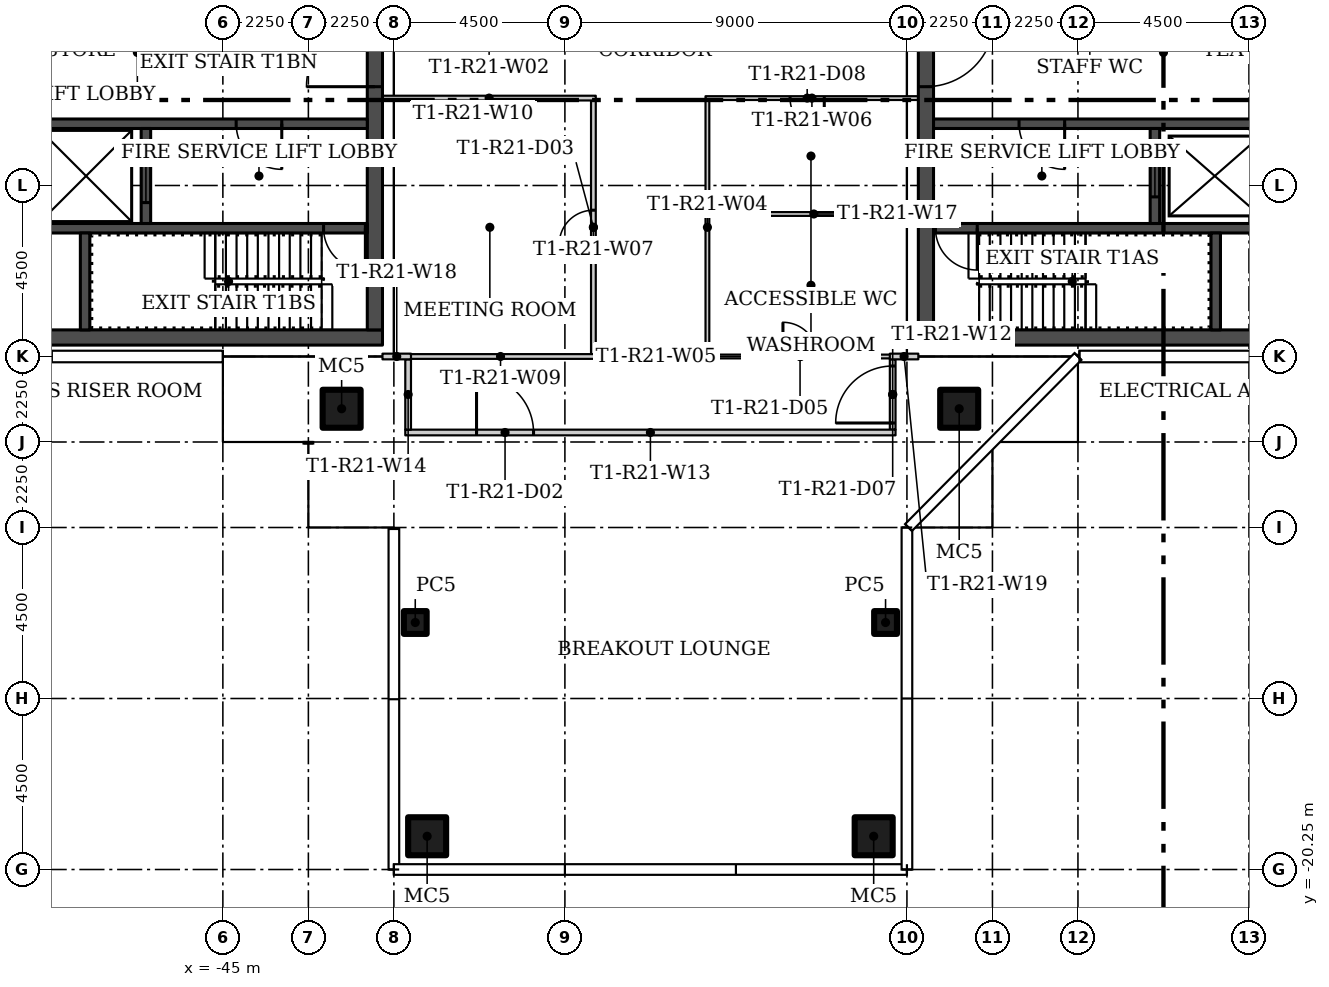
"""IFC4 building model, lengths in metres.
Left out: names, types, materials, properties, quantities, classifications, styles, units other than length and angle.
Written with IfcOpenShell. Run it as: python <this file> out.ifc"""

import sys

from ifc_helpers import new_model, si_unit, direction, frame, frame_2d, origin, origin_2d, place, context, subcontext, project, spatial, rectangle, hollow_rectangle, extrude, element, fill, save


model = new_model("IFC4")
c1 = context("Model", 3, precision=1e-05, world=origin(), true_north=direction((0.0, 1.0)))
c2 = subcontext(c1, "Body", "Model", "MODEL_VIEW")
j1 = project(units=[si_unit("LENGTHUNIT", "METRE"), si_unit("PLANEANGLEUNIT", "RADIAN")], contexts=[c1])
p1 = place(None, origin())
s1 = spatial("IfcSite", under=j1, at=p1, CompositionType="ELEMENT")
p2 = place(p1, origin())
s2 = spatial("IfcBuilding", under=s1, at=p2, CompositionType="ELEMENT")
p3 = place(p2, frame((0.0, 0.0, 194.4)))
s3 = spatial("IfcBuildingStorey", under=s2, at=p3, CompositionType="ELEMENT", Elevation=194.4)
for number, where in (
    (1, (-25.625, -8.125, 0.0)),
    (2, (-41.875, -8.125, 0.0)),
):
    element("IfcColumn", number, at=place(p3, frame(where)), inside=s3, PredefinedType="COLUMN", context=c2, shape_type="SweptSolid", body=[
        extrude(hollow_rectangle(XDim=1.0, YDim=1.0, WallThickness=0.04, at=origin_2d()), origin(), (0.0, 0.0, 1.0), 3.55),
    ])
p4 = place(p3, frame((-39.938, -13.75, 0.0)))
e3 = element("IfcColumn", 3, at=p4, inside=s3, PredefinedType="COLUMN", context=c2, shape_type="SweptSolid", body=[
    extrude(hollow_rectangle(XDim=0.6, YDim=0.6, WallThickness=0.02, at=origin_2d()), origin(), (0.0, 0.0, 1.0), 3.55),
])
p5 = place(p3, frame((-39.625, -19.375, 0.0)))
e4 = element("IfcColumn", 4, at=p5, inside=s3, PredefinedType="COLUMN", context=c2, shape_type="SweptSolid", body=[
    extrude(hollow_rectangle(XDim=1.0, YDim=1.0, WallThickness=0.04, at=origin_2d()), origin(), (0.0, 0.0, 1.0), 3.55),
])
p6 = place(p3, frame((-27.562, -13.75, 0.0)))
e5 = element("IfcColumn", 5, at=p6, inside=s3, PredefinedType="COLUMN", context=c2, shape_type="SweptSolid", body=[
    extrude(hollow_rectangle(XDim=0.6, YDim=0.6, WallThickness=0.02, at=origin_2d()), origin(), (0.0, 0.0, 1.0), 3.55),
])
p7 = place(p3, frame((-27.875, -19.375, 0.0)))
e6 = element("IfcColumn", 6, at=p7, inside=s3, PredefinedType="COLUMN", context=c2, shape_type="SweptSolid", body=[
    extrude(hollow_rectangle(XDim=1.0, YDim=1.0, WallThickness=0.04, at=origin_2d()), origin(), (0.0, 0.0, 1.0), 3.55),
])
p8 = place(p3, frame((-32.25, -0.0, 0.0), z_axis=(0.0, 0.0, 1.0), x_axis=(0.0, -1.0, 0.0)))
e7 = element("IfcWall", 7, at=p8, inside=s3, PredefinedType="PARTITIONING", context=c2, shape_type="SweptSolid", body=[
    extrude(rectangle(XDim=6.7, YDim=0.1, at=frame_2d((3.35, 0.0))), origin(), (0.0, 0.0, 1.0), 3.55),
])
p9 = place(p3, frame((-32.3, -6.75, 0.0)))
e8 = element("IfcWall", 8, at=p9, inside=s3, PredefinedType="PARTITIONING", context=c2, shape_type="SweptSolid", body=[
    extrude(rectangle(XDim=5.0, YDim=0.1, at=frame_2d((2.5, 0.0))), origin(), (0.0, 0.0, 1.0), 3.55),
])
p10 = place(p9, frame((2.038, 0.0, 0.0)))
e9 = element("IfcOpeningElement", 9, at=p10, cuts=e8, PredefinedType="OPENING", context=c2, shape_type="SweptSolid", body=[
    extrude(rectangle(XDim=0.9, YDim=2.1, at=frame_2d((0.45, 1.05))), frame((0.0, 0.06, 0.0), z_axis=(0.0, -1.0, 0.0), x_axis=(1.0, 0.0, 0.0)), (0.0, 0.0, 1.0), 0.12),
])
p11 = place(p3, frame((-26.7, 0.05, 0.0), z_axis=(0.0, 0.0, 1.0), x_axis=(-1.0, 0.0, 0.0)))
e10 = element("IfcWall", 10, at=p11, inside=s3, PredefinedType="PARTITIONING", context=c2, shape_type="SweptSolid", body=[
    extrude(rectangle(XDim=5.6, YDim=0.1, at=frame_2d((2.8, 0.0))), origin(), (0.0, 0.0, 1.0), 3.55),
])
p12 = place(p11, frame((2.475, 0.0, 0.0)))
e11 = element("IfcOpeningElement", 11, at=p12, cuts=e10, PredefinedType="OPENING", context=c2, shape_type="SweptSolid", body=[
    extrude(rectangle(XDim=0.9, YDim=2.1, at=frame_2d((0.45, 1.05))), frame((0.0, 0.06, 0.0), z_axis=(0.0, -1.0, 0.0), x_axis=(1.0, 0.0, 0.0)), (0.0, 0.0, 1.0), 0.12),
])
p13 = place(p3, frame((-35.25, -6.688, 0.0), z_axis=(0.0, 0.0, 1.0), x_axis=(0.0, 1.0, 0.0)))
e12 = element("IfcWall", 12, at=p13, inside=s3, PredefinedType="PARTITIONING", context=c2, shape_type="SweptSolid", body=[
    extrude(rectangle(XDim=6.675, YDim=0.125, at=frame_2d((3.337, 0.0))), origin(), (0.0, 0.0, 1.0), 3.55),
])
p14 = place(p13, frame((2.887, 0.0, 0.0)))
e13 = element("IfcOpeningElement", 13, at=p14, cuts=e12, PredefinedType="OPENING", context=c2, shape_type="SweptSolid", body=[
    extrude(rectangle(XDim=0.9, YDim=2.1, at=frame_2d((0.45, 1.05))), frame((0.0, 0.073, 0.0), z_axis=(0.0, -1.0, 0.0), x_axis=(1.0, 0.0, 0.0)), (0.0, 0.0, 1.0), 0.145),
])
p15 = place(p3, frame((-40.2, -6.75, 0.0)))
e14 = element("IfcWall", 14, at=p15, inside=s3, PredefinedType="PARTITIONING", context=c2, shape_type="SweptSolid", body=[
    extrude(rectangle(XDim=5.012, YDim=0.125, at=frame_2d((2.506, 0.0))), origin(), (0.0, 0.0, 1.0), 3.55),
])
p16 = place(p3, frame((-35.188, 0.05, 0.0), z_axis=(0.0, 0.0, 1.0), x_axis=(-1.0, 0.0, 0.0)))
e15 = element("IfcWall", 15, at=p16, inside=s3, PredefinedType="PARTITIONING", context=c2, shape_type="SweptSolid", body=[
    extrude(rectangle(XDim=5.613, YDim=0.125, at=frame_2d((2.806, 0.0))), origin(), (0.0, 0.0, 1.0), 3.55),
])
p17 = place(p3, frame((-27.375, -8.675, 0.0), z_axis=(0.0, 0.0, 1.0), x_axis=(0.0, 1.0, 0.0)))
e16 = element("IfcWall", 16, at=p17, inside=s3, PredefinedType="PARTITIONING", context=c2, shape_type="SweptSolid", body=[
    extrude(rectangle(XDim=1.85, YDim=0.15, at=frame_2d((0.925, 0.0))), origin(), (0.0, 0.0, 1.0), 3.55),
])
p18 = place(p17, frame((0.175, 0.0, 0.0)))
e17 = element("IfcOpeningElement", 17, at=p18, cuts=e16, PredefinedType="OPENING", context=c2, shape_type="SweptSolid", body=[
    extrude(rectangle(XDim=1.5, YDim=2.1, at=frame_2d((0.75, 1.05))), frame((0.0, 0.085, 0.0), z_axis=(0.0, -1.0, 0.0), x_axis=(1.0, 0.0, 0.0)), (0.0, 0.0, 1.0), 0.17),
])
p19 = place(p3, frame((-40.2, -8.75, 0.0)))
e18 = element("IfcWall", 18, at=p19, inside=s3, PredefinedType="PARTITIONING", context=c2, shape_type="SweptSolid", body=[
    extrude(rectangle(XDim=12.9, YDim=0.15, at=frame_2d((6.45, 0.0))), origin(), (0.0, 0.0, 1.0), 3.55),
])
p20 = place(p19, frame((1.875, 0.0, 0.0)))
e19 = element("IfcOpeningElement", 19, at=p20, cuts=e18, PredefinedType="OPENING", context=c2, shape_type="SweptSolid", body=[
    extrude(rectangle(XDim=1.5, YDim=2.1, at=frame_2d((0.75, 1.05))), frame((0.0, 0.085, 0.0), z_axis=(0.0, -1.0, 0.0), x_axis=(1.0, 0.0, 0.0)), (0.0, 0.0, 1.0), 0.17),
])
p21 = place(p3, frame((-40.125, -6.825, 0.0), z_axis=(0.0, 0.0, 1.0), x_axis=(0.0, -1.0, 0.0)))
e20 = element("IfcWall", 20, at=p21, inside=s3, PredefinedType="PARTITIONING", context=c2, shape_type="SweptSolid", body=[
    extrude(rectangle(XDim=1.85, YDim=0.15, at=frame_2d((0.925, 0.0))), origin(), (0.0, 0.0, 1.0), 3.55),
])
p22 = place(p3, frame((-26.7, -3.0, 0.0), z_axis=(0.0, 0.0, 1.0), x_axis=(-1.0, 0.0, 0.0)))
e21 = element("IfcWall", 21, at=p22, inside=s3, PredefinedType="PARTITIONING", context=c2, shape_type="SweptSolid", body=[
    extrude(rectangle(XDim=5.5, YDim=0.1, at=frame_2d((2.75, 0.0))), origin(), (0.0, 0.0, 1.0), 3.55),
])
for number, where in (
    (22, (-40.8, -6.75, 0.0)),
    (23, (-27.45, -6.75, 0.0)),
):
    element("IfcWall", number, at=place(p3, frame(where)), inside=s3, PredefinedType="PARTITIONING", context=c2, shape_type="SweptSolid", body=[
        extrude(rectangle(XDim=0.75, YDim=0.15, at=frame_2d((0.375, 0.0))), origin(), (0.0, 0.0, 1.0), 3.55),
    ])
p23 = place(p3, frame((-26.7, -6.25, 0.0)))
e24 = element("IfcWall", 24, at=p23, inside=s3, PredefinedType="SHEAR", context=c2, shape_type="SweptSolid", body=[
    extrude(rectangle(XDim=12.9, YDim=0.4, at=frame_2d((6.45, 0.0))), origin(), (0.0, 0.0, 1.0), 3.55),
])
p24 = place(p3, frame((-26.5, 6.05, 0.0), z_axis=(0.0, 0.0, 1.0), x_axis=(0.0, -1.0, 0.0)))
e25 = element("IfcWall", 25, at=p24, inside=s3, PredefinedType="SHEAR", context=c2, shape_type="SweptSolid", body=[
    extrude(rectangle(XDim=12.1, YDim=0.4, at=frame_2d((6.05, 0.0))), origin(), (0.0, 0.0, 1.0), 3.55),
])
p25 = place(p24, frame((3.9, 0.0, 0.0)))
e26 = element("IfcOpeningElement", 26, at=p25, cuts=e25, PredefinedType="OPENING", context=c2, shape_type="SweptSolid", body=[
    extrude(rectangle(XDim=1.8, YDim=2.4, at=frame_2d((0.9, 1.2))), frame((0.0, 0.21, 0.0), z_axis=(0.0, -1.0, 0.0), x_axis=(1.0, 0.0, 0.0)), (0.0, 0.0, 1.0), 0.42),
])
p26 = place(p3, frame((-14.2, -3.375, 0.0), z_axis=(0.0, 0.0, 1.0), x_axis=(-1.0, 0.0, 0.0)))
e27 = element("IfcWall", 27, at=p26, inside=s3, PredefinedType="SHEAR", context=c2, shape_type="SweptSolid", body=[
    extrude(rectangle(XDim=12.1, YDim=0.25, at=frame_2d((6.05, 0.0))), origin(), (0.0, 0.0, 1.0), 3.55),
])
p27 = place(p26, frame((10.95, 0.0, 0.0)))
e28 = element("IfcOpeningElement", 28, at=p27, cuts=e27, PredefinedType="OPENING", context=c2, shape_type="SweptSolid", body=[
    extrude(rectangle(XDim=1.1, YDim=2.1, at=frame_2d((0.55, 1.05))), frame((0.0, 0.135, 0.0), z_axis=(0.0, -1.0, 0.0), x_axis=(1.0, 0.0, 0.0)), (0.0, 0.0, 1.0), 0.27),
])
p28 = place(p3, frame((-18.875, -6.05, 0.0), z_axis=(0.0, 0.0, 1.0), x_axis=(0.0, 1.0, 0.0)))
e29 = element("IfcWall", 29, at=p28, inside=s3, PredefinedType="SHEAR", context=c2, shape_type="SweptSolid", body=[
    extrude(rectangle(XDim=2.55, YDim=0.25, at=frame_2d((1.275, 0.0))), origin(), (0.0, 0.0, 1.0), 3.55),
])
p29 = place(p3, frame((-14.2, -0.625, 0.0), z_axis=(0.0, 0.0, 1.0), x_axis=(-1.0, 0.0, 0.0)))
e30 = element("IfcWall", 30, at=p29, inside=s3, PredefinedType="SHEAR", context=c2, shape_type="SweptSolid", body=[
    extrude(rectangle(XDim=12.1, YDim=0.25, at=frame_2d((6.05, 0.0))), origin(), (0.0, 0.0, 1.0), 3.55),
])
p30 = place(p29, frame((8.65, 0.0, 0.0)))
e31 = element("IfcOpeningElement", 31, at=p30, cuts=e30, PredefinedType="OPENING", context=c2, shape_type="SweptSolid", body=[
    extrude(rectangle(XDim=1.2, YDim=2.1, at=frame_2d((0.6, 1.05))), frame((0.0, 0.135, 0.0), z_axis=(0.0, -1.0, 0.0), x_axis=(1.0, 0.0, 0.0)), (0.0, 0.0, 1.0), 0.27),
])
p31 = place(p29, frame((1.175, 0.0, 0.0)))
e32 = element("IfcOpeningElement", 32, at=p31, cuts=e30, PredefinedType="OPENING", context=c2, shape_type="SweptSolid", body=[
    extrude(rectangle(XDim=0.9, YDim=2.1, at=frame_2d((0.45, 1.05))), frame((0.0, 0.135, 0.0), z_axis=(0.0, -1.0, 0.0), x_axis=(1.0, 0.0, 0.0)), (0.0, 0.0, 1.0), 0.27),
])
p32 = place(p3, frame((-20.475, -3.25, 0.0), z_axis=(0.0, 0.0, 1.0), x_axis=(0.0, 1.0, 0.0)))
e33 = element("IfcWall", 33, at=p32, inside=s3, PredefinedType="SHEAR", context=c2, shape_type="SweptSolid", body=[
    extrude(rectangle(XDim=2.5, YDim=0.25, at=frame_2d((1.25, 0.0))), origin(), (0.0, 0.0, 1.0), 3.55),
])
p33 = place(p32, frame((0.7, 0.0, 0.0)))
e34 = element("IfcOpeningElement", 34, at=p33, cuts=e33, PredefinedType="OPENING", context=c2, shape_type="SweptSolid", body=[
    extrude(rectangle(XDim=1.1, YDim=2.1, at=frame_2d((0.55, 1.05))), frame((0.0, 0.135, 0.0), z_axis=(0.0, -1.0, 0.0), x_axis=(1.0, 0.0, 0.0)), (0.0, 0.0, 1.0), 0.27),
])
p34 = place(p3, frame((-40.8, -6.25, 0.0), z_axis=(0.0, 0.0, 1.0), x_axis=(-1.0, 0.0, 0.0)))
e35 = element("IfcWall", 35, at=p34, inside=s3, PredefinedType="SHEAR", context=c2, shape_type="SweptSolid", body=[
    extrude(rectangle(XDim=12.9, YDim=0.4, at=frame_2d((6.45, 0.0))), origin(), (0.0, 0.0, 1.0), 3.55),
])
p35 = place(p3, frame((-41.0, -6.05, 0.0), z_axis=(0.0, 0.0, 1.0), x_axis=(0.0, 1.0, 0.0)))
e36 = element("IfcWall", 36, at=p35, inside=s3, PredefinedType="SHEAR", context=c2, shape_type="SweptSolid", body=[
    extrude(rectangle(XDim=12.1, YDim=0.4, at=frame_2d((6.05, 0.0))), origin(), (0.0, 0.0, 1.0), 3.55),
])
p36 = place(p35, frame((6.4, 0.0, 0.0)))
e37 = element("IfcOpeningElement", 37, at=p36, cuts=e36, PredefinedType="OPENING", context=c2, shape_type="SweptSolid", body=[
    extrude(rectangle(XDim=1.8, YDim=2.4, at=frame_2d((0.9, 1.2))), frame((0.0, 0.21, 0.0), z_axis=(0.0, -1.0, 0.0), x_axis=(1.0, 0.0, 0.0)), (0.0, 0.0, 1.0), 0.42),
])
p37 = place(p3, frame((-41.2, -3.375, 0.0), z_axis=(0.0, 0.0, 1.0), x_axis=(-1.0, 0.0, 0.0)))
e38 = element("IfcWall", 38, at=p37, inside=s3, PredefinedType="SHEAR", context=c2, shape_type="SweptSolid", body=[
    extrude(rectangle(XDim=12.1, YDim=0.25, at=frame_2d((6.05, 0.0))), origin(), (0.0, 0.0, 1.0), 3.55),
])
p38 = place(p37, frame((0.05, 0.0, 0.0)))
e39 = element("IfcOpeningElement", 39, at=p38, cuts=e38, PredefinedType="OPENING", context=c2, shape_type="SweptSolid", body=[
    extrude(rectangle(XDim=1.1, YDim=2.1, at=frame_2d((0.55, 1.05))), frame((0.0, 0.135, 0.0), z_axis=(0.0, -1.0, 0.0), x_axis=(1.0, 0.0, 0.0)), (0.0, 0.0, 1.0), 0.27),
])
p39 = place(p3, frame((-48.625, -6.05, 0.0), z_axis=(0.0, 0.0, 1.0), x_axis=(0.0, 1.0, 0.0)))
e40 = element("IfcWall", 40, at=p39, inside=s3, PredefinedType="SHEAR", context=c2, shape_type="SweptSolid", body=[
    extrude(rectangle(XDim=2.55, YDim=0.25, at=frame_2d((1.275, 0.0))), origin(), (0.0, 0.0, 1.0), 3.55),
])
p40 = place(p3, frame((-41.2, -0.625, 0.0), z_axis=(0.0, 0.0, 1.0), x_axis=(-1.0, 0.0, 0.0)))
e41 = element("IfcWall", 41, at=p40, inside=s3, PredefinedType="SHEAR", context=c2, shape_type="SweptSolid", body=[
    extrude(rectangle(XDim=12.1, YDim=0.25, at=frame_2d((6.05, 0.0))), origin(), (0.0, 0.0, 1.0), 3.55),
])
p41 = place(p40, frame((2.25, 0.0, 0.0)))
e42 = element("IfcOpeningElement", 42, at=p41, cuts=e41, PredefinedType="OPENING", context=c2, shape_type="SweptSolid", body=[
    extrude(rectangle(XDim=1.2, YDim=2.1, at=frame_2d((0.6, 1.05))), frame((0.0, 0.135, 0.0), z_axis=(0.0, -1.0, 0.0), x_axis=(1.0, 0.0, 0.0)), (0.0, 0.0, 1.0), 0.27),
])
p42 = place(p40, frame((10.025, 0.0, 0.0)))
e43 = element("IfcOpeningElement", 43, at=p42, cuts=e41, PredefinedType="OPENING", context=c2, shape_type="SweptSolid", body=[
    extrude(rectangle(XDim=0.9, YDim=2.1, at=frame_2d((0.45, 1.05))), frame((0.0, 0.135, 0.0), z_axis=(0.0, -1.0, 0.0), x_axis=(1.0, 0.0, 0.0)), (0.0, 0.0, 1.0), 0.27),
])
p43 = place(p3, frame((-47.025, -3.25, 0.0), z_axis=(0.0, 0.0, 1.0), x_axis=(0.0, 1.0, 0.0)))
e44 = element("IfcWall", 44, at=p43, inside=s3, PredefinedType="SHEAR", context=c2, shape_type="SweptSolid", body=[
    extrude(rectangle(XDim=2.5, YDim=0.25, at=frame_2d((1.25, 0.0))), origin(), (0.0, 0.0, 1.0), 3.55),
])
p44 = place(p43, frame((0.55, 0.0, 0.0)))
e45 = element("IfcOpeningElement", 45, at=p44, cuts=e44, PredefinedType="OPENING", context=c2, shape_type="SweptSolid", body=[
    extrude(rectangle(XDim=1.4, YDim=2.4, at=frame_2d((0.7, 1.2))), frame((0.0, 0.135, 0.0), z_axis=(0.0, -1.0, 0.0), x_axis=(1.0, 0.0, 0.0)), (0.0, 0.0, 1.0), 0.27),
])
p45 = place(p20, origin())
e46 = element("IfcDoor", 46, at=p45, inside=s3, OperationType="DOUBLE_DOOR_SINGLE_SWING", PredefinedType="DOOR", context=c2, shape_type="SweptSolid", body=[
    extrude(rectangle(XDim=1.5, YDim=2.1, at=frame_2d((0.75, 1.05))), frame((0.0, 0.025, 0.0), z_axis=(0.0, -1.0, 0.0), x_axis=(1.0, 0.0, 0.0)), (0.0, 0.0, 1.0), 0.05),
])
fill(e19, e46)
p46 = place(p14, origin())
e47 = element("IfcDoor", 47, at=p46, inside=s3, OperationType="SINGLE_SWING_LEFT", PredefinedType="DOOR", context=c2, shape_type="SweptSolid", body=[
    extrude(rectangle(XDim=0.9, YDim=2.1, at=frame_2d((0.45, 1.05))), frame((0.0, 0.025, 0.0), z_axis=(0.0, -1.0, 0.0), x_axis=(1.0, 0.0, 0.0)), (0.0, 0.0, 1.0), 0.05),
])
fill(e13, e47)
p47 = place(p10, origin())
e48 = element("IfcDoor", 48, at=p47, inside=s3, OperationType="SINGLE_SWING_LEFT", PredefinedType="DOOR", context=c2, shape_type="SweptSolid", body=[
    extrude(rectangle(XDim=0.9, YDim=2.1, at=frame_2d((0.45, 1.05))), frame((0.0, 0.025, 0.0), z_axis=(0.0, -1.0, 0.0), x_axis=(1.0, 0.0, 0.0)), (0.0, 0.0, 1.0), 0.05),
])
fill(e9, e48)
p48 = place(p18, origin())
e49 = element("IfcDoor", 49, at=p48, inside=s3, OperationType="DOUBLE_DOOR_SINGLE_SWING", PredefinedType="DOOR", context=c2, shape_type="SweptSolid", body=[
    extrude(rectangle(XDim=1.5, YDim=2.1, at=frame_2d((0.75, 1.05))), frame((0.0, 0.025, 0.0), z_axis=(0.0, -1.0, 0.0), x_axis=(1.0, 0.0, 0.0)), (0.0, 0.0, 1.0), 0.05),
])
fill(e17, e49)
p49 = place(p12, origin())
e50 = element("IfcDoor", 50, at=p49, inside=s3, OperationType="SINGLE_SWING_LEFT", PredefinedType="DOOR", context=c2, shape_type="SweptSolid", body=[
    extrude(rectangle(XDim=0.9, YDim=2.1, at=frame_2d((0.45, 1.05))), frame((0.0, 0.025, 0.0), z_axis=(0.0, -1.0, 0.0), x_axis=(1.0, 0.0, 0.0)), (0.0, 0.0, 1.0), 0.05),
])
fill(e11, e50)
p50 = place(p25, origin())
e51 = element("IfcDoor", 51, at=p50, inside=s3, OperationType="DOUBLE_DOOR_SINGLE_SWING", PredefinedType="DOOR", context=c2, shape_type="SweptSolid", body=[
    extrude(rectangle(XDim=1.8, YDim=2.4, at=frame_2d((0.9, 1.2))), frame((0.0, 0.025, 0.0), z_axis=(0.0, -1.0, 0.0), x_axis=(1.0, 0.0, 0.0)), (0.0, 0.0, 1.0), 0.05),
])
fill(e26, e51)
p51 = place(p27, origin())
e52 = element("IfcDoor", 52, at=p51, inside=s3, OperationType="SINGLE_SWING_RIGHT", PredefinedType="DOOR", context=c2, shape_type="SweptSolid", body=[
    extrude(rectangle(XDim=1.1, YDim=2.1, at=frame_2d((0.55, 1.05))), frame((0.0, 0.025, 0.0), z_axis=(0.0, -1.0, 0.0), x_axis=(1.0, 0.0, 0.0)), (0.0, 0.0, 1.0), 0.05),
])
fill(e28, e52)
p52 = place(p30, origin())
e53 = element("IfcDoor", 53, at=p52, inside=s3, OperationType="SINGLE_SWING_RIGHT", PredefinedType="DOOR", context=c2, shape_type="SweptSolid", body=[
    extrude(rectangle(XDim=1.2, YDim=2.1, at=frame_2d((0.6, 1.05))), frame((0.0, 0.025, 0.0), z_axis=(0.0, -1.0, 0.0), x_axis=(1.0, 0.0, 0.0)), (0.0, 0.0, 1.0), 0.05),
])
fill(e31, e53)
p53 = place(p33, origin())
e54 = element("IfcDoor", 54, at=p53, inside=s3, OperationType="SLIDING_TO_LEFT", PredefinedType="DOOR", context=c2, shape_type="SweptSolid", body=[
    extrude(rectangle(XDim=1.1, YDim=2.1, at=frame_2d((0.55, 1.05))), frame((0.0, 0.025, 0.0), z_axis=(0.0, -1.0, 0.0), x_axis=(1.0, 0.0, 0.0)), (0.0, 0.0, 1.0), 0.05),
])
fill(e34, e54)
p54 = place(p36, origin())
e55 = element("IfcDoor", 55, at=p54, inside=s3, OperationType="DOUBLE_DOOR_SINGLE_SWING", PredefinedType="DOOR", context=c2, shape_type="SweptSolid", body=[
    extrude(rectangle(XDim=1.8, YDim=2.4, at=frame_2d((0.9, 1.2))), frame((0.0, 0.025, 0.0), z_axis=(0.0, -1.0, 0.0), x_axis=(1.0, 0.0, 0.0)), (0.0, 0.0, 1.0), 0.05),
])
fill(e37, e55)
p55 = place(p38, origin())
e56 = element("IfcDoor", 56, at=p55, inside=s3, OperationType="SINGLE_SWING_LEFT", PredefinedType="DOOR", context=c2, shape_type="SweptSolid", body=[
    extrude(rectangle(XDim=1.1, YDim=2.1, at=frame_2d((0.55, 1.05))), frame((0.0, 0.025, 0.0), z_axis=(0.0, -1.0, 0.0), x_axis=(1.0, 0.0, 0.0)), (0.0, 0.0, 1.0), 0.05),
])
fill(e39, e56)
p56 = place(p41, origin())
e57 = element("IfcDoor", 57, at=p56, inside=s3, OperationType="SINGLE_SWING_LEFT", PredefinedType="DOOR", context=c2, shape_type="SweptSolid", body=[
    extrude(rectangle(XDim=1.2, YDim=2.1, at=frame_2d((0.6, 1.05))), frame((0.0, 0.025, 0.0), z_axis=(0.0, -1.0, 0.0), x_axis=(1.0, 0.0, 0.0)), (0.0, 0.0, 1.0), 0.05),
])
fill(e42, e57)
p57 = place(p44, origin())
e58 = element("IfcDoor", 58, at=p57, inside=s3, OperationType="SLIDING_TO_LEFT", PredefinedType="DOOR", context=c2, shape_type="SweptSolid", body=[
    extrude(rectangle(XDim=1.4, YDim=2.4, at=frame_2d((0.7, 1.2))), frame((0.0, 0.025, 0.0), z_axis=(0.0, -1.0, 0.0), x_axis=(1.0, 0.0, 0.0)), (0.0, 0.0, 1.0), 0.05),
])
fill(e45, e58)
save(model, sys.argv[1])
